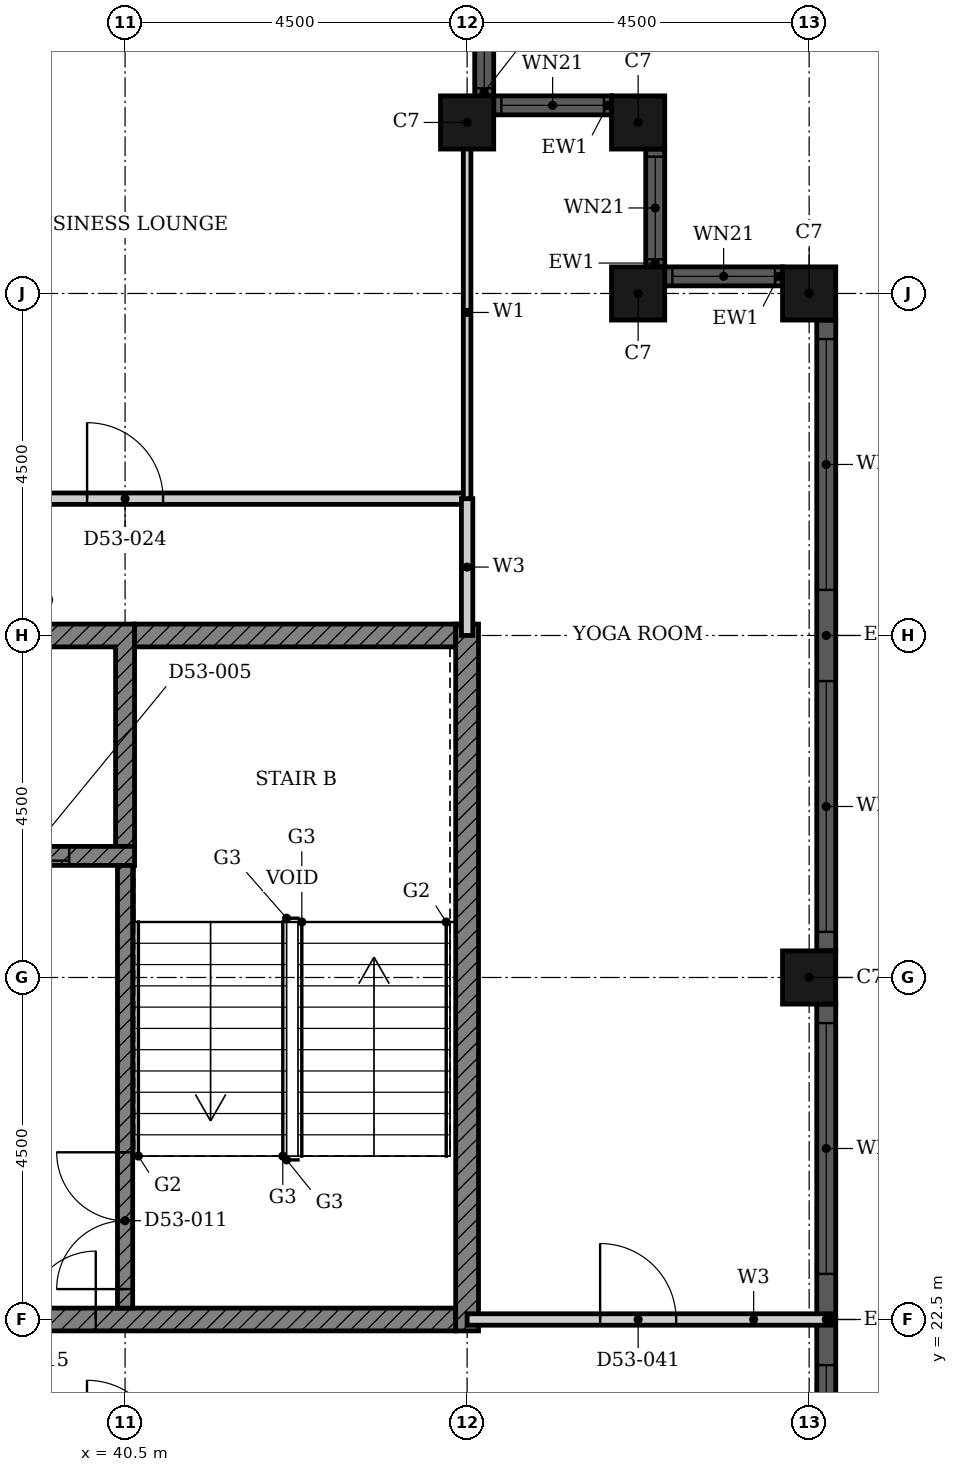
"""IFC4 building model, lengths in metres.
Left out: names, types, materials, properties, quantities, classifications, styles, units other than length and angle.
Written with IfcOpenShell. Run it as: python <this file> out.ifc"""

import sys

from ifc_helpers import new_model, si_unit, direction, frame, frame_2d, origin, origin_2d, place, context, subcontext, project, spatial, polyline, rectangle, hollow_rectangle, outline, extrude, element, fill, save


model = new_model("IFC4")
c1 = context("Model", 3, precision=1e-05, world=origin(), true_north=direction((0.0, 1.0)))
c2 = subcontext(c1, "Body", "Model", "MODEL_VIEW")
j1 = project(units=[si_unit("LENGTHUNIT", "METRE"), si_unit("PLANEANGLEUNIT", "RADIAN")], contexts=[c1])
p1 = place(None, origin())
s1 = spatial("IfcSite", under=j1, at=p1, CompositionType="ELEMENT")
p2 = place(p1, origin())
s2 = spatial("IfcBuilding", under=s1, at=p2, CompositionType="ELEMENT")
p3 = place(p2, frame((0.0, 0.0, 210.9)))
s3 = spatial("IfcBuildingStorey", under=s2, at=p3, CompositionType="ELEMENT", Elevation=210.9)
for number, where, z_axis, x_axis in (
    (1, (49.5, 27.0, 0.0), (0.0, 0.0, 1.0), (1.0, 0.0, 0.0)),
    (2, (49.5, 36.0, 0.0), (0.0, 0.0, 1.0), (1.0, 0.0, 0.0)),
    (3, (47.25, 36.0, 0.0), (0.0, 0.0, 1.0), (1.0, 0.0, 0.0)),
    (4, (47.25, 38.25, 0.0), (0.0, 0.0, 1.0), (1.0, 0.0, 0.0)),
    (5, (45.0, 38.25, 0.0), (0.0, 0.0, 1.0), (1.0, 0.0, 0.0)),
):
    element("IfcColumn", number, at=place(p3, frame(where, z_axis=z_axis, x_axis=x_axis)), inside=s3, PredefinedType="COLUMN", context=c2, shape_type="SweptSolid", body=[
        extrude(hollow_rectangle(XDim=0.7, YDim=0.7, WallThickness=0.022, at=origin_2d()), origin(), (0.0, 0.0, 1.0), 3.7),
    ])
p4 = place(p3, frame((49.725, 18.35, 0.0), z_axis=(0.0, 0.0, 1.0), x_axis=(0.0, 1.0, 0.0)))
e6 = element("IfcWall", 6, at=p4, inside=s3, PredefinedType="SOLIDWALL", context=c2, shape_type="SweptSolid", body=[
    extrude(rectangle(XDim=8.3, YDim=0.25, at=frame_2d((4.15, 0.0))), origin(), (0.0, 0.0, 1.0), 3.7),
])
p5 = place(p4, frame((0.25, 0.0, 0.45)))
e7 = element("IfcOpeningElement", 7, at=p5, cuts=e6, PredefinedType="OPENING", context=c2, shape_type="SweptSolid", body=[
    extrude(rectangle(XDim=3.3, YDim=2.3, at=frame_2d((1.65, 1.15))), frame((0.0, 0.135, 0.0), z_axis=(0.0, -1.0, 0.0), x_axis=(1.0, 0.0, 0.0)), (0.0, 0.0, 1.0), 0.27),
])
p6 = place(p4, frame((4.75, 0.0, 0.45)))
e8 = element("IfcOpeningElement", 8, at=p6, cuts=e6, PredefinedType="OPENING", context=c2, shape_type="SweptSolid", body=[
    extrude(rectangle(XDim=3.3, YDim=2.3, at=frame_2d((1.65, 1.15))), frame((0.0, 0.135, 0.0), z_axis=(0.0, -1.0, 0.0), x_axis=(1.0, 0.0, 0.0)), (0.0, 0.0, 1.0), 0.27),
])
p7 = place(p3, frame((49.725, 27.35, 0.0), z_axis=(0.0, 0.0, 1.0), x_axis=(0.0, 1.0, 0.0)))
e9 = element("IfcWall", 9, at=p7, inside=s3, PredefinedType="SOLIDWALL", context=c2, shape_type="SweptSolid", body=[
    extrude(rectangle(XDim=8.3, YDim=0.25, at=frame_2d((4.15, 0.0))), origin(), (0.0, 0.0, 1.0), 3.7),
])
p8 = place(p7, frame((0.25, 0.0, 0.45)))
e10 = element("IfcOpeningElement", 10, at=p8, cuts=e9, PredefinedType="OPENING", context=c2, shape_type="SweptSolid", body=[
    extrude(rectangle(XDim=3.3, YDim=2.3, at=frame_2d((1.65, 1.15))), frame((0.0, 0.135, 0.0), z_axis=(0.0, -1.0, 0.0), x_axis=(1.0, 0.0, 0.0)), (0.0, 0.0, 1.0), 0.27),
])
p9 = place(p7, frame((4.75, 0.0, 0.45)))
e11 = element("IfcOpeningElement", 11, at=p9, cuts=e9, PredefinedType="OPENING", context=c2, shape_type="SweptSolid", body=[
    extrude(rectangle(XDim=3.3, YDim=2.3, at=frame_2d((1.65, 1.15))), frame((0.0, 0.135, 0.0), z_axis=(0.0, -1.0, 0.0), x_axis=(1.0, 0.0, 0.0)), (0.0, 0.0, 1.0), 0.27),
])
p10 = place(p3, frame((49.15, 36.225, 0.0), z_axis=(0.0, 0.0, 1.0), x_axis=(-1.0, 0.0, 0.0)))
e12 = element("IfcWall", 12, at=p10, inside=s3, PredefinedType="SOLIDWALL", context=c2, shape_type="SweptSolid", body=[
    extrude(rectangle(XDim=1.55, YDim=0.25, at=frame_2d((0.775, 0.0))), origin(), (0.0, 0.0, 1.0), 3.7),
])
p11 = place(p10, frame((0.1, 0.0, 0.9)))
e13 = element("IfcOpeningElement", 13, at=p11, cuts=e12, PredefinedType="OPENING", context=c2, shape_type="SweptSolid", body=[
    extrude(rectangle(XDim=1.35, YDim=1.85, at=frame_2d((0.675, 0.925))), frame((0.0, 0.135, 0.0), z_axis=(0.0, -1.0, 0.0), x_axis=(1.0, 0.0, 0.0)), (0.0, 0.0, 1.0), 0.27),
])
p12 = place(p3, frame((47.475, 36.35, 0.0), z_axis=(0.0, 0.0, 1.0), x_axis=(0.0, 1.0, 0.0)))
e14 = element("IfcWall", 14, at=p12, inside=s3, PredefinedType="SOLIDWALL", context=c2, shape_type="SweptSolid", body=[
    extrude(rectangle(XDim=1.55, YDim=0.25, at=frame_2d((0.775, 0.0))), origin(), (0.0, 0.0, 1.0), 3.7),
])
p13 = place(p12, frame((0.1, 0.0, 0.9)))
e15 = element("IfcOpeningElement", 15, at=p13, cuts=e14, PredefinedType="OPENING", context=c2, shape_type="SweptSolid", body=[
    extrude(rectangle(XDim=1.35, YDim=1.85, at=frame_2d((0.675, 0.925))), frame((0.0, 0.135, 0.0), z_axis=(0.0, -1.0, 0.0), x_axis=(1.0, 0.0, 0.0)), (0.0, 0.0, 1.0), 0.27),
])
p14 = place(p3, frame((46.9, 38.475, 0.0), z_axis=(0.0, 0.0, 1.0), x_axis=(-1.0, 0.0, 0.0)))
e16 = element("IfcWall", 16, at=p14, inside=s3, PredefinedType="SOLIDWALL", context=c2, shape_type="SweptSolid", body=[
    extrude(rectangle(XDim=1.55, YDim=0.25, at=frame_2d((0.775, 0.0))), origin(), (0.0, 0.0, 1.0), 3.7),
])
p15 = place(p14, frame((0.1, 0.0, 0.9)))
e17 = element("IfcOpeningElement", 17, at=p15, cuts=e16, PredefinedType="OPENING", context=c2, shape_type="SweptSolid", body=[
    extrude(rectangle(XDim=1.35, YDim=1.85, at=frame_2d((0.675, 0.925))), frame((0.0, 0.135, 0.0), z_axis=(0.0, -1.0, 0.0), x_axis=(1.0, 0.0, 0.0)), (0.0, 0.0, 1.0), 0.27),
])
p16 = place(p3, frame((45.225, 38.6, 0.0), z_axis=(0.0, 0.0, 1.0), x_axis=(0.0, 1.0, 0.0)))
e18 = element("IfcWall", 18, at=p16, inside=s3, PredefinedType="SOLIDWALL", context=c2, shape_type="SweptSolid", body=[
    extrude(rectangle(XDim=1.55, YDim=0.25, at=frame_2d((0.775, 0.0))), origin(), (0.0, 0.0, 1.0), 3.7),
])
p17 = place(p16, frame((0.1, 0.0, 0.9)))
e19 = element("IfcOpeningElement", 19, at=p17, cuts=e18, PredefinedType="OPENING", context=c2, shape_type="SweptSolid", body=[
    extrude(rectangle(XDim=1.35, YDim=1.85, at=frame_2d((0.675, 0.925))), frame((0.0, 0.135, 0.0), z_axis=(0.0, -1.0, 0.0), x_axis=(1.0, 0.0, 0.0)), (0.0, 0.0, 1.0), 0.27),
])
p18 = place(p3, origin())
e20 = element("IfcWall", 20, at=p18, inside=s3, PredefinedType="SHEAR", context=c2, shape_type="SweptSolid", body=[
    extrude(outline(polyline([(35.232, 28.725), (35.482, 28.725), (35.482, 31.35), (37.803, 31.35), (37.803, 28.725), (38.053, 28.725), (38.053, 31.35), (40.375, 31.35), (40.375, 28.725), (40.625, 28.725), (40.625, 31.65), (35.232, 31.65), (35.232, 28.725)])), origin(), (0.0, 0.0, 1.0), 3.4),
])
p19 = place(p3, frame((32.911, 22.5, 0.0), z_axis=(0.0, 0.0, 1.0), x_axis=(1.0, 0.0, 0.0)))
e21 = element("IfcWall", 21, at=p19, inside=s3, PredefinedType="SHEAR", context=c2, shape_type="SweptSolid", body=[
    extrude(rectangle(XDim=11.939, YDim=0.3, at=frame_2d((5.97, 0.0))), origin(), (0.0, 0.0, 1.0), 3.4),
])
p20 = place(p19, frame((5.404, 0.0, 0.0)))
e22 = element("IfcOpeningElement", 22, at=p20, cuts=e21, PredefinedType="OPENING", context=c2, shape_type="SweptSolid", body=[
    extrude(rectangle(XDim=1.8, YDim=2.1, at=frame_2d((0.9, 1.05))), frame((0.0, 0.16, 0.0), z_axis=(0.0, -1.0, 0.0), x_axis=(1.0, 0.0, 0.0)), (0.0, 0.0, 1.0), 0.32),
])
p21 = place(p3, frame((40.625, 31.5, 0.0), z_axis=(0.0, 0.0, 1.0), x_axis=(1.0, 0.0, 0.0)))
e23 = element("IfcWall", 23, at=p21, inside=s3, PredefinedType="SHEAR", context=c2, shape_type="SweptSolid", body=[
    extrude(rectangle(XDim=4.225, YDim=0.3, at=frame_2d((2.113, 0.0))), origin(), (0.0, 0.0, 1.0), 3.4),
])
p22 = place(p3, frame((45.0, 22.35, 0.0), z_axis=(0.0, 0.0, 1.0), x_axis=(0.0, 1.0, 0.0)))
e24 = element("IfcWall", 24, at=p22, inside=s3, PredefinedType="SHEAR", context=c2, shape_type="SweptSolid", body=[
    extrude(rectangle(XDim=9.3, YDim=0.3, at=frame_2d((4.65, 0.0))), origin(), (0.0, 0.0, 1.0), 3.4),
])
p23 = place(p3, frame((24.947, 28.6, 0.0), z_axis=(0.0, 0.0, 1.0), x_axis=(1.0, 0.0, 0.0)))
e25 = element("IfcWall", 25, at=p23, inside=s3, PredefinedType="SHEAR", context=c2, shape_type="SweptSolid", body=[
    extrude(rectangle(XDim=15.678, YDim=0.25, at=frame_2d((7.839, 0.0))), origin(), (0.0, 0.0, 1.0), 3.4),
])
p24 = place(p23, frame((6.004, 0.0, 0.0)))
e26 = element("IfcOpeningElement", 26, at=p24, cuts=e25, PredefinedType="OPENING", context=c2, shape_type="SweptSolid", body=[
    extrude(rectangle(XDim=1.1, YDim=2.1, at=frame_2d((0.55, 1.05))), frame((0.0, 0.135, 0.0), z_axis=(0.0, -1.0, 0.0), x_axis=(1.0, 0.0, 0.0)), (0.0, 0.0, 1.0), 0.27),
])
p25 = place(p23, frame((11.146, 0.0, 0.0)))
e27 = element("IfcOpeningElement", 27, at=p25, cuts=e25, PredefinedType="OPENING", context=c2, shape_type="SweptSolid", body=[
    extrude(rectangle(XDim=1.1, YDim=2.1, at=frame_2d((0.55, 1.05))), frame((0.0, 0.135, 0.0), z_axis=(0.0, -1.0, 0.0), x_axis=(1.0, 0.0, 0.0)), (0.0, 0.0, 1.0), 0.27),
])
p26 = place(p23, frame((13.718, 0.0, 0.0)))
e28 = element("IfcOpeningElement", 28, at=p26, cuts=e25, PredefinedType="OPENING", context=c2, shape_type="SweptSolid", body=[
    extrude(rectangle(XDim=1.1, YDim=2.1, at=frame_2d((0.55, 1.05))), frame((0.0, 0.135, 0.0), z_axis=(0.0, -1.0, 0.0), x_axis=(1.0, 0.0, 0.0)), (0.0, 0.0, 1.0), 0.27),
])
p27 = place(p23, frame((0.961, 0.0, 0.0)))
e29 = element("IfcOpeningElement", 29, at=p27, cuts=e25, PredefinedType="OPENING", context=c2, shape_type="SweptSolid", body=[
    extrude(rectangle(XDim=0.9, YDim=2.1, at=frame_2d((0.45, 1.05))), frame((0.0, 0.135, 0.0), z_axis=(0.0, -1.0, 0.0), x_axis=(1.0, 0.0, 0.0)), (0.0, 0.0, 1.0), 0.27),
])
p28 = place(p23, frame((8.675, 0.0, 0.0)))
e30 = element("IfcOpeningElement", 30, at=p28, cuts=e25, PredefinedType="OPENING", context=c2, shape_type="SweptSolid", body=[
    extrude(rectangle(XDim=0.9, YDim=2.1, at=frame_2d((0.45, 1.05))), frame((0.0, 0.135, 0.0), z_axis=(0.0, -1.0, 0.0), x_axis=(1.0, 0.0, 0.0)), (0.0, 0.0, 1.0), 0.27),
])
p29 = place(p3, frame((40.5, 22.65, 0.0), z_axis=(0.0, 0.0, 1.0), x_axis=(0.0, 1.0, 0.0)))
e31 = element("IfcWall", 31, at=p29, inside=s3, PredefinedType="SHEAR", context=c2, shape_type="SweptSolid", body=[
    extrude(rectangle(XDim=5.825, YDim=0.2, at=frame_2d((2.913, 0.0))), origin(), (0.0, 0.0, 1.0), 3.4),
])
p30 = place(p29, frame((0.25, 0.0, 0.0)))
e32 = element("IfcOpeningElement", 32, at=p30, cuts=e31, PredefinedType="OPENING", context=c2, shape_type="SweptSolid", body=[
    extrude(rectangle(XDim=1.8, YDim=2.1, at=frame_2d((0.9, 1.05))), frame((0.0, 0.11, 0.0), z_axis=(0.0, -1.0, 0.0), x_axis=(1.0, 0.0, 0.0)), (0.0, 0.0, 1.0), 0.22),
])
p31 = place(p3, frame((45.0, 22.5, 0.0), z_axis=(0.0, 0.0, 1.0), x_axis=(1.0, 0.0, 0.0)))
e33 = element("IfcWall", 33, at=p31, inside=s3, PredefinedType="PARTITIONING", context=c2, shape_type="SweptSolid", body=[
    extrude(rectangle(XDim=4.79, YDim=0.15, at=frame_2d((2.395, 0.0))), origin(), (0.0, 0.0, 1.0), 3.4),
])
p32 = place(p31, frame((1.75, 0.0, 0.0)))
e34 = element("IfcOpeningElement", 34, at=p32, cuts=e33, PredefinedType="OPENING", context=c2, shape_type="SweptSolid", body=[
    extrude(rectangle(XDim=1.0, YDim=2.1, at=frame_2d((0.5, 1.05))), frame((0.0, 0.085, 0.0), z_axis=(0.0, -1.0, 0.0), x_axis=(1.0, 0.0, 0.0)), (0.0, 0.0, 1.0), 0.17),
])
p33 = place(p3, frame((36.0, 33.3, 0.0), z_axis=(0.0, 0.0, 1.0), x_axis=(1.0, 0.0, 0.0)))
e35 = element("IfcWall", 35, at=p33, inside=s3, PredefinedType="PARTITIONING", context=c2, shape_type="SweptSolid", body=[
    extrude(rectangle(XDim=9.0, YDim=0.15, at=frame_2d((4.5, 0.0))), origin(), (0.0, 0.0, 1.0), 3.4),
])
p34 = place(p33, frame((4.0, 0.0, 0.0)))
e36 = element("IfcOpeningElement", 36, at=p34, cuts=e35, PredefinedType="OPENING", context=c2, shape_type="SweptSolid", body=[
    extrude(rectangle(XDim=1.0, YDim=2.1, at=frame_2d((0.5, 1.05))), frame((0.0, 0.085, 0.0), z_axis=(0.0, -1.0, 0.0), x_axis=(1.0, 0.0, 0.0)), (0.0, 0.0, 1.0), 0.17),
])
p35 = place(p3, frame((45.0, 31.5, 0.0), z_axis=(0.0, 0.0, 1.0), x_axis=(0.0, 1.0, 0.0)))
e37 = element("IfcWall", 37, at=p35, inside=s3, PredefinedType="PARTITIONING", context=c2, shape_type="SweptSolid", body=[
    extrude(rectangle(XDim=1.8, YDim=0.15, at=frame_2d((0.9, 0.0))), origin(), (0.0, 0.0, 1.0), 3.4),
])
p36 = place(p3, frame((45.0, 33.3, 0.0), z_axis=(0.0, 0.0, 1.0), x_axis=(0.0, 1.0, 0.0)))
e38 = element("IfcWall", 38, at=p36, inside=s3, PredefinedType="PARTITIONING", context=c2, shape_type="SweptSolid", body=[
    extrude(rectangle(XDim=4.9, YDim=0.1, at=frame_2d((2.45, 0.0))), origin(), (0.0, 0.0, 1.0), 3.4),
])
p37 = place(p5, origin())
e39 = element("IfcWindow", 39, at=p37, inside=s3, PartitioningType="SINGLE_PANEL", PredefinedType="WINDOW", context=c2, shape_type="SweptSolid", body=[
    extrude(rectangle(XDim=3.3, YDim=2.3, at=frame_2d((1.65, 1.15))), frame((0.0, 0.03, 0.0), z_axis=(0.0, -1.0, 0.0), x_axis=(1.0, 0.0, 0.0)), (0.0, 0.0, 1.0), 0.06),
])
fill(e7, e39)
p38 = place(p6, origin())
e40 = element("IfcWindow", 40, at=p38, inside=s3, PartitioningType="SINGLE_PANEL", PredefinedType="WINDOW", context=c2, shape_type="SweptSolid", body=[
    extrude(rectangle(XDim=3.3, YDim=2.3, at=frame_2d((1.65, 1.15))), frame((0.0, 0.03, 0.0), z_axis=(0.0, -1.0, 0.0), x_axis=(1.0, 0.0, 0.0)), (0.0, 0.0, 1.0), 0.06),
])
fill(e8, e40)
p39 = place(p8, origin())
e41 = element("IfcWindow", 41, at=p39, inside=s3, PartitioningType="SINGLE_PANEL", PredefinedType="WINDOW", context=c2, shape_type="SweptSolid", body=[
    extrude(rectangle(XDim=3.3, YDim=2.3, at=frame_2d((1.65, 1.15))), frame((0.0, 0.03, 0.0), z_axis=(0.0, -1.0, 0.0), x_axis=(1.0, 0.0, 0.0)), (0.0, 0.0, 1.0), 0.06),
])
fill(e10, e41)
p40 = place(p9, origin())
e42 = element("IfcWindow", 42, at=p40, inside=s3, PartitioningType="SINGLE_PANEL", PredefinedType="WINDOW", context=c2, shape_type="SweptSolid", body=[
    extrude(rectangle(XDim=3.3, YDim=2.3, at=frame_2d((1.65, 1.15))), frame((0.0, 0.03, 0.0), z_axis=(0.0, -1.0, 0.0), x_axis=(1.0, 0.0, 0.0)), (0.0, 0.0, 1.0), 0.06),
])
fill(e11, e42)
p41 = place(p11, origin())
e43 = element("IfcWindow", 43, at=p41, inside=s3, PartitioningType="SINGLE_PANEL", PredefinedType="WINDOW", context=c2, shape_type="SweptSolid", body=[
    extrude(rectangle(XDim=1.35, YDim=1.85, at=frame_2d((0.675, 0.925))), frame((0.0, 0.03, 0.0), z_axis=(0.0, -1.0, 0.0), x_axis=(1.0, 0.0, 0.0)), (0.0, 0.0, 1.0), 0.06),
])
fill(e13, e43)
p42 = place(p13, origin())
e44 = element("IfcWindow", 44, at=p42, inside=s3, PartitioningType="SINGLE_PANEL", PredefinedType="WINDOW", context=c2, shape_type="SweptSolid", body=[
    extrude(rectangle(XDim=1.35, YDim=1.85, at=frame_2d((0.675, 0.925))), frame((0.0, 0.03, 0.0), z_axis=(0.0, -1.0, 0.0), x_axis=(1.0, 0.0, 0.0)), (0.0, 0.0, 1.0), 0.06),
])
fill(e15, e44)
p43 = place(p15, origin())
e45 = element("IfcWindow", 45, at=p43, inside=s3, PartitioningType="SINGLE_PANEL", PredefinedType="WINDOW", context=c2, shape_type="SweptSolid", body=[
    extrude(rectangle(XDim=1.35, YDim=1.85, at=frame_2d((0.675, 0.925))), frame((0.0, 0.03, 0.0), z_axis=(0.0, -1.0, 0.0), x_axis=(1.0, 0.0, 0.0)), (0.0, 0.0, 1.0), 0.06),
])
fill(e17, e45)
p44 = place(p17, origin())
e46 = element("IfcWindow", 46, at=p44, inside=s3, PartitioningType="SINGLE_PANEL", PredefinedType="WINDOW", context=c2, shape_type="SweptSolid", body=[
    extrude(rectangle(XDim=1.35, YDim=1.85, at=frame_2d((0.675, 0.925))), frame((0.0, 0.03, 0.0), z_axis=(0.0, -1.0, 0.0), x_axis=(1.0, 0.0, 0.0)), (0.0, 0.0, 1.0), 0.06),
])
fill(e19, e46)
p45 = place(p26, origin())
e47 = element("IfcDoor", 47, at=p45, inside=s3, OperationType="DOUBLE_DOOR_SLIDING", PredefinedType="DOOR", context=c2, shape_type="SweptSolid", body=[
    extrude(rectangle(XDim=1.1, YDim=2.1, at=frame_2d((0.55, 1.05))), frame((0.0, 0.025, 0.0), z_axis=(0.0, -1.0, 0.0), x_axis=(1.0, 0.0, 0.0)), (0.0, 0.0, 1.0), 0.05),
])
fill(e28, e47)
p46 = place(p30, origin())
e48 = element("IfcDoor", 48, at=p46, inside=s3, OperationType="DOUBLE_DOOR_SINGLE_SWING", PredefinedType="DOOR", context=c2, shape_type="SweptSolid", body=[
    extrude(rectangle(XDim=1.8, YDim=2.1, at=frame_2d((0.9, 1.05))), frame((0.0, 0.025, 0.0), z_axis=(0.0, -1.0, 0.0), x_axis=(1.0, 0.0, 0.0)), (0.0, 0.0, 1.0), 0.05),
])
fill(e32, e48)
p47 = place(p20, origin())
e49 = element("IfcDoor", 49, at=p47, inside=s3, OperationType="DOUBLE_DOOR_SINGLE_SWING", PredefinedType="DOOR", context=c2, shape_type="SweptSolid", body=[
    extrude(rectangle(XDim=1.8, YDim=2.1, at=frame_2d((0.9, 1.05))), frame((0.0, 0.025, 0.0), z_axis=(0.0, -1.0, 0.0), x_axis=(1.0, 0.0, 0.0)), (0.0, 0.0, 1.0), 0.05),
])
fill(e22, e49)
p48 = place(p34, origin())
e50 = element("IfcDoor", 50, at=p48, inside=s3, OperationType="SINGLE_SWING_RIGHT", PredefinedType="DOOR", context=c2, shape_type="SweptSolid", body=[
    extrude(rectangle(XDim=1.0, YDim=2.1, at=frame_2d((0.5, 1.05))), frame((0.0, 0.025, 0.0), z_axis=(0.0, -1.0, 0.0), x_axis=(1.0, 0.0, 0.0)), (0.0, 0.0, 1.0), 0.05),
])
fill(e36, e50)
p49 = place(p32, origin())
e51 = element("IfcDoor", 51, at=p49, inside=s3, OperationType="SINGLE_SWING_RIGHT", PredefinedType="DOOR", context=c2, shape_type="SweptSolid", body=[
    extrude(rectangle(XDim=1.0, YDim=2.1, at=frame_2d((0.5, 1.05))), frame((0.0, 0.025, 0.0), z_axis=(0.0, -1.0, 0.0), x_axis=(1.0, 0.0, 0.0)), (0.0, 0.0, 1.0), 0.05),
])
fill(e34, e51)
save(model, sys.argv[1])
